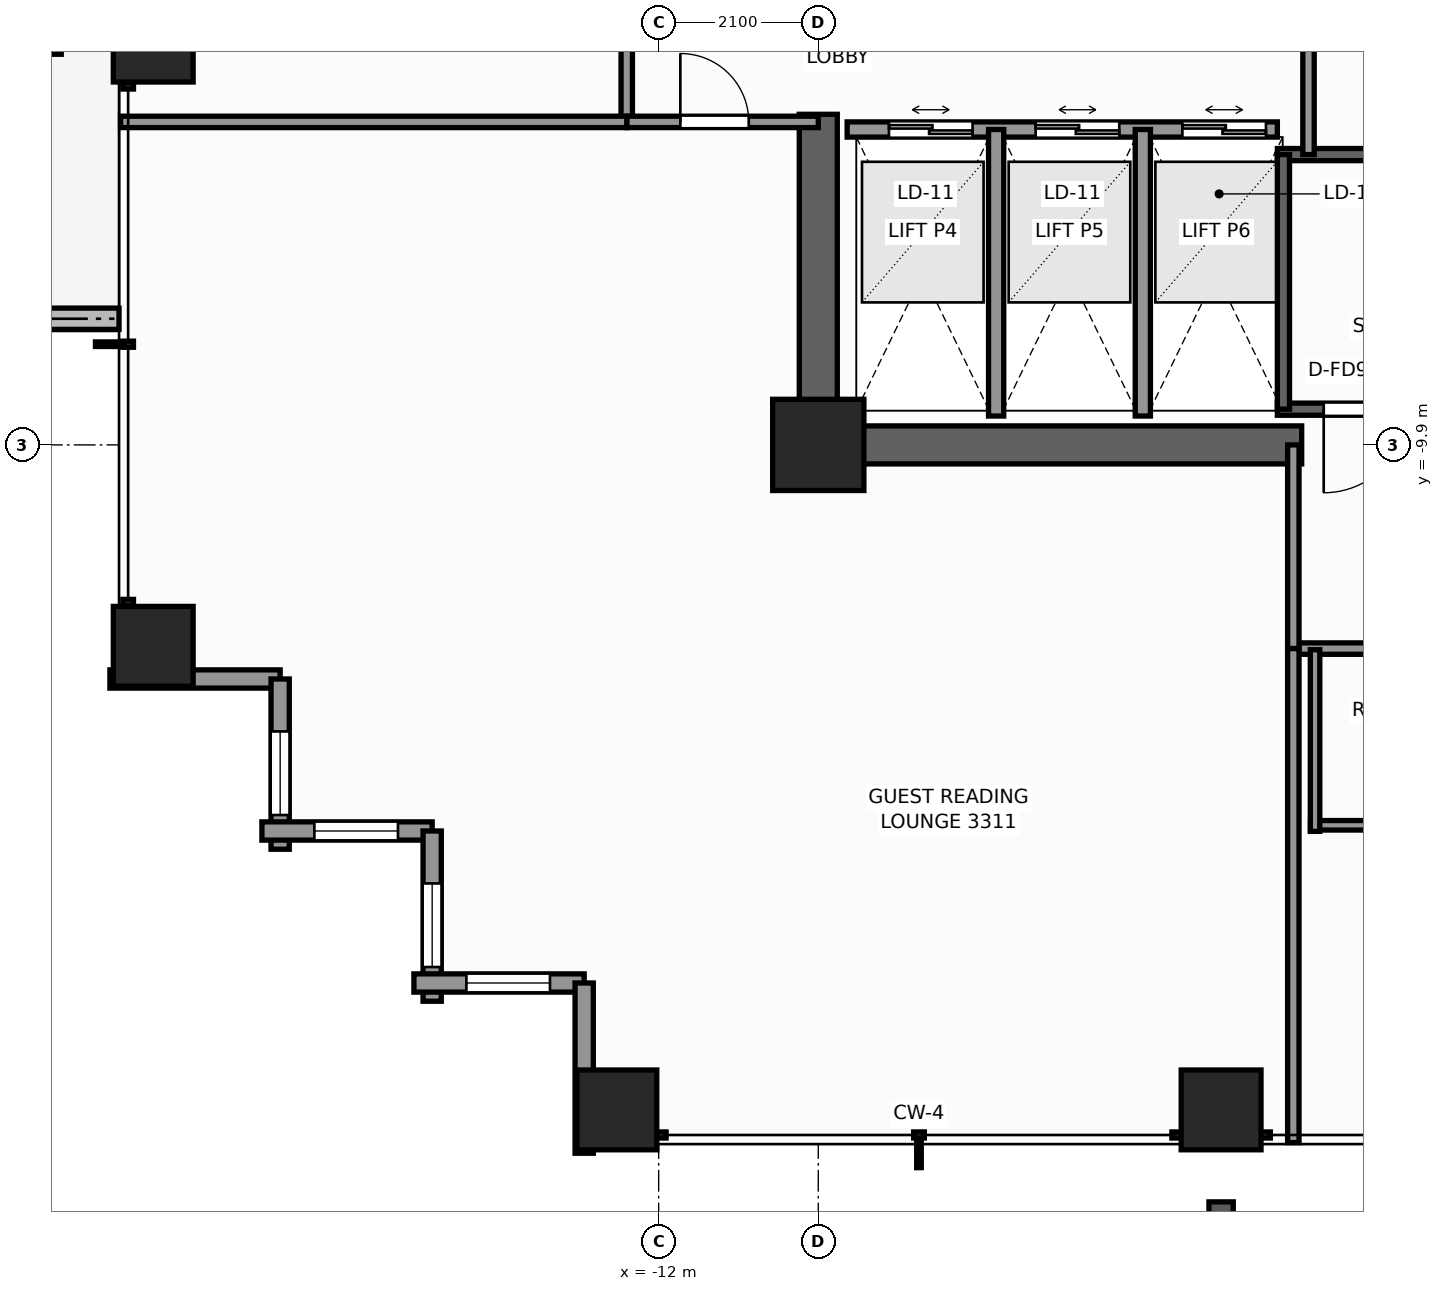
"""IFC4 building model, lengths in metres.
Left out: names, types, materials, properties, quantities, classifications, styles, units other than length and angle.
Written with IfcOpenShell. Run it as: python <this file> out.ifc"""

import sys

from ifc_helpers import new_model, si_unit, direction, frame, frame_2d, origin, origin_2d, place, context, subcontext, project, spatial, rectangle, extrude, element, fill, save


model = new_model("IFC4")
c1 = context("Model", 3, precision=1e-05, world=origin(), true_north=direction((0.0, 1.0)))
c2 = subcontext(c1, "Body", "Model", "MODEL_VIEW")
j1 = project(units=[si_unit("LENGTHUNIT", "METRE"), si_unit("PLANEANGLEUNIT", "RADIAN")], contexts=[c1])
p1 = place(None, origin())
s1 = spatial("IfcSite", under=j1, at=p1, CompositionType="ELEMENT")
p2 = place(p1, origin())
s2 = spatial("IfcBuilding", under=s1, at=p2, CompositionType="ELEMENT")
p3 = place(p2, frame((0.0, 0.0, 115.1)))
s3 = spatial("IfcBuildingStorey", under=s2, at=p3, CompositionType="ELEMENT", Elevation=115.1)
p4 = place(p3, frame((-3.54, -9.9, 0.0), z_axis=(0.0, 0.0, 1.0), x_axis=(-1.0, 0.0, 0.0)))
e1 = element("IfcWall", 1, at=p4, inside=s3, PredefinedType="SHEAR", context=c2, shape_type="SweptSolid", body=[
    extrude(rectangle(XDim=6.61, YDim=0.5, at=frame_2d((3.305, 0.0))), origin(), (0.0, 0.0, 1.0), 3.3),
])
p5 = place(p3, frame((-9.9, -9.65, 0.0), z_axis=(0.0, 0.0, 1.0), x_axis=(0.0, 1.0, 0.0)))
e2 = element("IfcWall", 2, at=p5, inside=s3, PredefinedType="SHEAR", context=c2, shape_type="SweptSolid", body=[
    extrude(rectangle(XDim=4.1, YDim=0.5, at=frame_2d((2.05, 0.0))), origin(), (0.0, 0.0, 1.0), 3.3),
])
p6 = place(p3, frame((-9.9, -9.9, 0.0), z_axis=(0.0, 0.0, 1.0), x_axis=(1.0, 0.0, 0.0)))
e3 = element("IfcColumn", 3, at=p6, inside=s3, PredefinedType="COLUMN", context=c2, shape_type="SweptSolid", body=[
    extrude(rectangle(XDim=1.2, YDim=1.2, at=origin_2d()), origin(), (0.0, 0.0, 1.0), 3.3),
])
for number, where, z_axis, x_axis in (
    (4, (-12.55, -18.65, 0.0), (0.0, 0.0, 1.0), (1.0, 0.0, 0.0)),
    (5, (-4.6, -18.65, 0.0), (0.0, 0.0, 1.0), (1.0, 0.0, 0.0)),
    (6, (-18.65, -12.55, 0.0), (0.0, 0.0, 1.0), (1.0, 0.0, 0.0)),
    (7, (-18.65, -4.6, 0.0), (0.0, 0.0, 1.0), (1.0, 0.0, 0.0)),
):
    element("IfcColumn", number, at=place(p3, frame(where, z_axis=z_axis, x_axis=x_axis)), inside=s3, PredefinedType="COLUMN", context=c2, shape_type="SweptSolid", body=[
        extrude(rectangle(XDim=1.05, YDim=1.05, at=origin_2d()), origin(), (0.0, 0.0, 1.0), 3.3),
    ])
p7 = place(p3, frame((-22.52, -8.24, -0.04), z_axis=(0.0, 0.0, 1.0), x_axis=(1.0, 0.0, 0.0)))
e8 = element("IfcWall", 8, at=p7, inside=s3, PredefinedType="PARAPET", context=c2, shape_type="SweptSolid", body=[
    extrude(rectangle(XDim=3.42, YDim=0.28, at=frame_2d((1.71, 0.0))), origin(), (0.0, 0.0, 1.0), 0.42),
])
p8 = place(p3, frame((-16.98, -12.98, 0.0), z_axis=(0.0, 0.0, 1.0), x_axis=(-1.0, 0.0, 0.0)))
e9 = element("IfcWall", 9, at=p8, inside=s3, PredefinedType="STANDARD", context=c2, shape_type="SweptSolid", body=[
    extrude(rectangle(XDim=2.24, YDim=0.24, at=frame_2d((1.12, 0.0))), origin(), (0.0, 0.0, 1.0), 2.459),
])
p9 = place(p3, frame((-16.98, -15.22, 0.0), z_axis=(0.0, 0.0, 1.0), x_axis=(0.0, 1.0, 0.0)))
e10 = element("IfcWall", 10, at=p9, inside=s3, PredefinedType="STANDARD", context=c2, shape_type="SweptSolid", body=[
    extrude(rectangle(XDim=2.24, YDim=0.24, at=frame_2d((1.12, 0.0))), origin(), (0.0, 0.0, 1.0), 2.459),
])
p10 = place(p9, frame((0.45, 0.0, 0.65)))
e11 = element("IfcOpeningElement", 11, at=p10, cuts=e10, PredefinedType="OPENING", context=c2, shape_type="SweptSolid", body=[
    extrude(rectangle(XDim=1.1, YDim=1.45, at=frame_2d((0.55, 0.725))), frame((0.0, 0.13, 0.0), z_axis=(0.0, -1.0, 0.0), x_axis=(1.0, 0.0, 0.0)), (0.0, 0.0, 1.0), 0.26),
])
p11 = place(p3, frame((-14.98, -14.98, 0.0), z_axis=(0.0, 0.0, 1.0), x_axis=(-1.0, 0.0, 0.0)))
e12 = element("IfcWall", 12, at=p11, inside=s3, PredefinedType="STANDARD", context=c2, shape_type="SweptSolid", body=[
    extrude(rectangle(XDim=2.24, YDim=0.24, at=frame_2d((1.12, 0.0))), origin(), (0.0, 0.0, 1.0), 2.459),
])
p12 = place(p11, frame((0.45, 0.0, 0.65)))
e13 = element("IfcOpeningElement", 13, at=p12, cuts=e12, PredefinedType="OPENING", context=c2, shape_type="SweptSolid", body=[
    extrude(rectangle(XDim=1.1, YDim=1.45, at=frame_2d((0.55, 0.725))), frame((0.0, 0.13, 0.0), z_axis=(0.0, -1.0, 0.0), x_axis=(1.0, 0.0, 0.0)), (0.0, 0.0, 1.0), 0.26),
])
p13 = place(p3, frame((-14.98, -17.22, 0.0), z_axis=(0.0, 0.0, 1.0), x_axis=(0.0, 1.0, 0.0)))
e14 = element("IfcWall", 14, at=p13, inside=s3, PredefinedType="STANDARD", context=c2, shape_type="SweptSolid", body=[
    extrude(rectangle(XDim=2.24, YDim=0.24, at=frame_2d((1.12, 0.0))), origin(), (0.0, 0.0, 1.0), 2.459),
])
p14 = place(p13, frame((0.45, 0.0, 0.65)))
e15 = element("IfcOpeningElement", 15, at=p14, cuts=e14, PredefinedType="OPENING", context=c2, shape_type="SweptSolid", body=[
    extrude(rectangle(XDim=1.1, YDim=1.45, at=frame_2d((0.55, 0.725))), frame((0.0, 0.13, 0.0), z_axis=(0.0, -1.0, 0.0), x_axis=(1.0, 0.0, 0.0)), (0.0, 0.0, 1.0), 0.26),
])
p15 = place(p3, frame((-12.98, -16.98, 0.0), z_axis=(0.0, 0.0, 1.0), x_axis=(-1.0, 0.0, 0.0)))
e16 = element("IfcWall", 16, at=p15, inside=s3, PredefinedType="STANDARD", context=c2, shape_type="SweptSolid", body=[
    extrude(rectangle(XDim=2.24, YDim=0.24, at=frame_2d((1.12, 0.0))), origin(), (0.0, 0.0, 1.0), 2.459),
])
p16 = place(p15, frame((0.45, 0.0, 0.65)))
e17 = element("IfcOpeningElement", 17, at=p16, cuts=e16, PredefinedType="OPENING", context=c2, shape_type="SweptSolid", body=[
    extrude(rectangle(XDim=1.1, YDim=1.45, at=frame_2d((0.55, 0.725))), frame((0.0, 0.13, 0.0), z_axis=(0.0, -1.0, 0.0), x_axis=(1.0, 0.0, 0.0)), (0.0, 0.0, 1.0), 0.26),
])
p17 = place(p3, frame((-12.98, -19.22, 0.0), z_axis=(0.0, 0.0, 1.0), x_axis=(0.0, 1.0, 0.0)))
e18 = element("IfcWall", 18, at=p17, inside=s3, PredefinedType="STANDARD", context=c2, shape_type="SweptSolid", body=[
    extrude(rectangle(XDim=2.24, YDim=0.24, at=frame_2d((1.12, 0.0))), origin(), (0.0, 0.0, 1.0), 2.459),
])
p18 = place(p3, frame((3.86, -9.43, 0.0), z_axis=(0.0, 0.0, 1.0), x_axis=(-1.0, 0.0, 0.0)))
e19 = element("IfcWall", 19, at=p18, inside=s3, PredefinedType="SHEAR", context=c2, shape_type="SweptSolid", body=[
    extrude(rectangle(XDim=7.72, YDim=0.16, at=frame_2d((3.86, 0.0))), origin(), (0.0, 0.0, 1.0), 3.3),
])
p19 = place(p18, frame((6.01, 0.0, 0.0)))
e20 = element("IfcOpeningElement", 20, at=p19, cuts=e19, PredefinedType="OPENING", context=c2, shape_type="SweptSolid", body=[
    extrude(rectangle(XDim=1.1, YDim=2.2, at=frame_2d((0.55, 1.1))), frame((0.0, 0.09, 0.0), z_axis=(0.0, -1.0, 0.0), x_axis=(1.0, 0.0, 0.0)), (0.0, 0.0, 1.0), 0.18),
])
p20 = place(p3, frame((-3.86, -6.08, 0.0), z_axis=(0.0, 0.0, 1.0), x_axis=(1.0, 0.0, 0.0)))
e21 = element("IfcWall", 21, at=p20, inside=s3, PredefinedType="SHEAR", context=c2, shape_type="SweptSolid", body=[
    extrude(rectangle(XDim=7.72, YDim=0.16, at=frame_2d((3.86, 0.0))), origin(), (0.0, 0.0, 1.0), 3.3),
])
p21 = place(p3, frame((-3.78, -9.43, 0.0), z_axis=(0.0, 0.0, 1.0), x_axis=(0.0, 1.0, 0.0)))
e22 = element("IfcWall", 22, at=p21, inside=s3, PredefinedType="SHEAR", context=c2, shape_type="SweptSolid", body=[
    extrude(rectangle(XDim=3.35, YDim=0.16, at=frame_2d((1.675, 0.0))), origin(), (0.0, 0.0, 1.0), 3.3),
])
p22 = place(p3, frame((-9.52, -5.75, 0.0), z_axis=(0.0, 0.0, 1.0), x_axis=(1.0, 0.0, 0.0)))
e23 = element("IfcWall", 23, at=p22, inside=s3, PredefinedType="SOLIDWALL", context=c2, shape_type="SweptSolid", body=[
    extrude(rectangle(XDim=5.66, YDim=0.2, at=frame_2d((2.83, 0.0))), origin(), (0.0, 0.0, 1.0), 3.08),
])
p23 = place(p22, frame((0.55, 0.0, 0.0)))
e24 = element("IfcOpeningElement", 24, at=p23, cuts=e23, PredefinedType="OPENING", context=c2, shape_type="SweptSolid", body=[
    extrude(rectangle(XDim=1.1, YDim=2.2, at=frame_2d((0.55, 1.1))), frame((0.0, 0.11, 0.0), z_axis=(0.0, -1.0, 0.0), x_axis=(1.0, 0.0, 0.0)), (0.0, 0.0, 1.0), 0.22),
])
p24 = place(p22, frame((2.48, 0.0, 0.0)))
e25 = element("IfcOpeningElement", 25, at=p24, cuts=e23, PredefinedType="OPENING", context=c2, shape_type="SweptSolid", body=[
    extrude(rectangle(XDim=1.1, YDim=2.2, at=frame_2d((0.55, 1.1))), frame((0.0, 0.11, 0.0), z_axis=(0.0, -1.0, 0.0), x_axis=(1.0, 0.0, 0.0)), (0.0, 0.0, 1.0), 0.22),
])
p25 = place(p22, frame((4.41, 0.0, 0.0)))
e26 = element("IfcOpeningElement", 26, at=p25, cuts=e23, PredefinedType="OPENING", context=c2, shape_type="SweptSolid", body=[
    extrude(rectangle(XDim=1.1, YDim=2.2, at=frame_2d((0.55, 1.1))), frame((0.0, 0.11, 0.0), z_axis=(0.0, -1.0, 0.0), x_axis=(1.0, 0.0, 0.0)), (0.0, 0.0, 1.0), 0.22),
])
for number, where, z_axis, x_axis in (
    (27, (-7.56, -9.52, 0.0), (0.0, 0.0, 1.0), (0.0, 1.0, 0.0)),
    (28, (-5.63, -9.52, 0.0), (0.0, 0.0, 1.0), (0.0, 1.0, 0.0)),
):
    element("IfcWall", number, at=place(p3, frame(where, z_axis=z_axis, x_axis=x_axis)), inside=s3, PredefinedType="SOLIDWALL", context=c2, shape_type="SweptSolid", body=[
        extrude(rectangle(XDim=3.77, YDim=0.2, at=frame_2d((1.885, 0.0))), origin(), (0.0, 0.0, 1.0), 3.08),
    ])
p26 = place(p3, frame((-3.45, -6.08, 0.0), z_axis=(0.0, 0.0, 1.0), x_axis=(0.0, 1.0, 0.0)))
e29 = element("IfcWall", 29, at=p26, inside=s3, PredefinedType="PARTITIONING", context=c2, shape_type="SweptSolid", body=[
    extrude(rectangle(XDim=2.36, YDim=0.15, at=frame_2d((1.18, 0.0))), origin(), (0.0, 0.0, 1.0), 3.08),
])
p27 = place(p3, frame((-3.65, -12.58, 0.0), z_axis=(0.0, 0.0, 1.0), x_axis=(1.0, 0.0, 0.0)))
e30 = element("IfcWall", 30, at=p27, inside=s3, PredefinedType="PARTITIONING", context=c2, shape_type="SweptSolid", body=[
    extrude(rectangle(XDim=15.91, YDim=0.15, at=frame_2d((7.955, 0.0))), origin(), (0.0, 0.0, 1.0), 2.292),
])
p28 = place(p27, frame((5.109, 0.0, 0.0)))
e31 = element("IfcOpeningElement", 31, at=p28, cuts=e30, PredefinedType="OPENING", context=c2, shape_type="SweptSolid", body=[
    extrude(rectangle(XDim=0.95, YDim=2.06, at=frame_2d((0.475, 1.03))), frame((0.0, 0.085, 0.0), z_axis=(0.0, -1.0, 0.0), x_axis=(1.0, 0.0, 0.0)), (0.0, 0.0, 1.0), 0.17),
])
p29 = place(p27, frame((9.858, 0.0, 0.0)))
e32 = element("IfcOpeningElement", 32, at=p29, cuts=e30, PredefinedType="OPENING", context=c2, shape_type="SweptSolid", body=[
    extrude(rectangle(XDim=0.9, YDim=2.06, at=frame_2d((0.45, 1.03))), frame((0.0, 0.085, 0.0), z_axis=(0.0, -1.0, 0.0), x_axis=(1.0, 0.0, 0.0)), (0.0, 0.0, 1.0), 0.17),
])
p30 = place(p27, frame((12.028, 0.0, 0.0)))
e33 = element("IfcOpeningElement", 33, at=p30, cuts=e30, PredefinedType="OPENING", context=c2, shape_type="SweptSolid", body=[
    extrude(rectangle(XDim=0.9, YDim=2.06, at=frame_2d((0.45, 1.03))), frame((0.0, 0.085, 0.0), z_axis=(0.0, -1.0, 0.0), x_axis=(1.0, 0.0, 0.0)), (0.0, 0.0, 1.0), 0.17),
])
p31 = place(p3, frame((-3.65, -12.58, 0.0), z_axis=(0.0, 0.0, 1.0), x_axis=(0.0, 1.0, 0.0)))
e34 = element("IfcWall", 34, at=p31, inside=s3, PredefinedType="PARTITIONING", context=c2, shape_type="SweptSolid", body=[
    extrude(rectangle(XDim=2.68, YDim=0.15, at=frame_2d((1.34, 0.0))), origin(), (0.0, 0.0, 1.0), 3.08),
])
p32 = place(p3, frame((-12.42, -5.65, 0.0), z_axis=(0.0, 0.0, 1.0), x_axis=(0.0, 1.0, 0.0)))
e35 = element("IfcWall", 35, at=p32, inside=s3, PredefinedType="PARTITIONING", context=c2, shape_type="SweptSolid", body=[
    extrude(rectangle(XDim=3.6, YDim=0.15, at=frame_2d((1.8, 0.0))), origin(), (0.0, 0.0, 1.0), 2.292),
])
p33 = place(p32, frame((2.156, 0.0, 0.0)))
e36 = element("IfcOpeningElement", 36, at=p33, cuts=e35, PredefinedType="OPENING", context=c2, shape_type="SweptSolid", body=[
    extrude(rectangle(XDim=0.9, YDim=2.06, at=frame_2d((0.45, 1.03))), frame((0.0, 0.085, 0.0), z_axis=(0.0, -1.0, 0.0), x_axis=(1.0, 0.0, 0.0)), (0.0, 0.0, 1.0), 0.17),
])
p34 = place(p3, frame((-12.42, -5.65, 0.0), z_axis=(0.0, 0.0, 1.0), x_axis=(1.0, 0.0, 0.0)))
e37 = element("IfcWall", 37, at=p34, inside=s3, PredefinedType="PARTITIONING", context=c2, shape_type="SweptSolid", body=[
    extrude(rectangle(XDim=2.52, YDim=0.15, at=frame_2d((1.26, 0.0))), origin(), (0.0, 0.0, 1.0), 3.08),
])
p35 = place(p34, frame((0.705, 0.0, 0.0)))
e38 = element("IfcOpeningElement", 38, at=p35, cuts=e37, PredefinedType="OPENING", context=c2, shape_type="SweptSolid", body=[
    extrude(rectangle(XDim=0.9, YDim=2.06, at=frame_2d((0.45, 1.03))), frame((0.0, 0.085, 0.0), z_axis=(0.0, -1.0, 0.0), x_axis=(1.0, 0.0, 0.0)), (0.0, 0.0, 1.0), 0.17),
])
p36 = place(p3, frame((-19.08, -5.65, 0.0), z_axis=(0.0, 0.0, 1.0), x_axis=(1.0, 0.0, 0.0)))
e39 = element("IfcWall", 39, at=p36, inside=s3, PredefinedType="PARTITIONING", context=c2, shape_type="SweptSolid", body=[
    extrude(rectangle(XDim=6.66, YDim=0.15, at=frame_2d((3.33, 0.0))), origin(), (0.0, 0.0, 1.0), 2.449),
])
p37 = place(p3, frame((-3.65, -19.08, 0.0), z_axis=(0.0, 0.0, 1.0), x_axis=(0.0, 1.0, 0.0)))
e40 = element("IfcWall", 40, at=p37, inside=s3, PredefinedType="PARTITIONING", context=c2, shape_type="SweptSolid", body=[
    extrude(rectangle(XDim=6.5, YDim=0.15, at=frame_2d((3.25, 0.0))), origin(), (0.0, 0.0, 1.0), 2.449),
])
p38 = place(p3, frame((-3.424, -14.905, 0.0), z_axis=(0.0, 0.0, 1.0), x_axis=(1.0, 0.0, 0.0)))
e41 = element("IfcWall", 41, at=p38, inside=s3, PredefinedType="PARTITIONING", context=c2, shape_type="SweptSolid", body=[
    extrude(rectangle(XDim=2.77, YDim=0.125, at=frame_2d((1.385, 0.0))), origin(), (0.0, 0.0, 1.0), 2.369),
])
p39 = place(p3, frame((-3.364, -14.985, 0.0), z_axis=(0.0, 0.0, 1.0), x_axis=(0.0, 1.0, 0.0)))
e42 = element("IfcWall", 42, at=p39, inside=s3, PredefinedType="PARTITIONING", context=c2, shape_type="SweptSolid", body=[
    extrude(rectangle(XDim=2.39, YDim=0.125, at=frame_2d((1.195, 0.0))), origin(), (0.0, 0.0, 1.0), 3.08),
])
p40 = place(p10, origin())
e43 = element("IfcWindow", 43, at=p40, inside=s3, PartitioningType="SINGLE_PANEL", PredefinedType="WINDOW", context=c2, shape_type="SweptSolid", body=[
    extrude(rectangle(XDim=1.1, YDim=1.45, at=frame_2d((0.55, 0.725))), frame((0.0, 0.03, 0.0), z_axis=(0.0, -1.0, 0.0), x_axis=(1.0, 0.0, 0.0)), (0.0, 0.0, 1.0), 0.06),
])
fill(e11, e43)
p41 = place(p12, origin())
e44 = element("IfcWindow", 44, at=p41, inside=s3, PartitioningType="SINGLE_PANEL", PredefinedType="WINDOW", context=c2, shape_type="SweptSolid", body=[
    extrude(rectangle(XDim=1.1, YDim=1.45, at=frame_2d((0.55, 0.725))), frame((0.0, 0.03, 0.0), z_axis=(0.0, -1.0, 0.0), x_axis=(1.0, 0.0, 0.0)), (0.0, 0.0, 1.0), 0.06),
])
fill(e13, e44)
p42 = place(p14, origin())
e45 = element("IfcWindow", 45, at=p42, inside=s3, PartitioningType="SINGLE_PANEL", PredefinedType="WINDOW", context=c2, shape_type="SweptSolid", body=[
    extrude(rectangle(XDim=1.1, YDim=1.45, at=frame_2d((0.55, 0.725))), frame((0.0, 0.03, 0.0), z_axis=(0.0, -1.0, 0.0), x_axis=(1.0, 0.0, 0.0)), (0.0, 0.0, 1.0), 0.06),
])
fill(e15, e45)
p43 = place(p16, origin())
e46 = element("IfcWindow", 46, at=p43, inside=s3, PartitioningType="SINGLE_PANEL", PredefinedType="WINDOW", context=c2, shape_type="SweptSolid", body=[
    extrude(rectangle(XDim=1.1, YDim=1.45, at=frame_2d((0.55, 0.725))), frame((0.0, 0.03, 0.0), z_axis=(0.0, -1.0, 0.0), x_axis=(1.0, 0.0, 0.0)), (0.0, 0.0, 1.0), 0.06),
])
fill(e17, e46)
p44 = place(p19, origin())
e47 = element("IfcDoor", 47, at=p44, inside=s3, OperationType="SINGLE_SWING_RIGHT", PredefinedType="DOOR", context=c2, shape_type="SweptSolid", body=[
    extrude(rectangle(XDim=1.1, YDim=2.2, at=frame_2d((0.55, 1.1))), frame((0.0, 0.025, 0.0), z_axis=(0.0, -1.0, 0.0), x_axis=(1.0, 0.0, 0.0)), (0.0, 0.0, 1.0), 0.05),
])
fill(e20, e47)
p45 = place(p23, origin())
e48 = element("IfcDoor", 48, at=p45, inside=s3, OperationType="DOUBLE_DOOR_SLIDING", PredefinedType="DOOR", context=c2, shape_type="SweptSolid", body=[
    extrude(rectangle(XDim=1.1, YDim=2.2, at=frame_2d((0.55, 1.1))), frame((0.0, 0.025, 0.0), z_axis=(0.0, -1.0, 0.0), x_axis=(1.0, 0.0, 0.0)), (0.0, 0.0, 1.0), 0.05),
])
fill(e24, e48)
p46 = place(p24, origin())
e49 = element("IfcDoor", 49, at=p46, inside=s3, OperationType="DOUBLE_DOOR_SLIDING", PredefinedType="DOOR", context=c2, shape_type="SweptSolid", body=[
    extrude(rectangle(XDim=1.1, YDim=2.2, at=frame_2d((0.55, 1.1))), frame((0.0, 0.025, 0.0), z_axis=(0.0, -1.0, 0.0), x_axis=(1.0, 0.0, 0.0)), (0.0, 0.0, 1.0), 0.05),
])
fill(e25, e49)
p47 = place(p25, origin())
e50 = element("IfcDoor", 50, at=p47, inside=s3, OperationType="DOUBLE_DOOR_SLIDING", PredefinedType="DOOR", context=c2, shape_type="SweptSolid", body=[
    extrude(rectangle(XDim=1.1, YDim=2.2, at=frame_2d((0.55, 1.1))), frame((0.0, 0.025, 0.0), z_axis=(0.0, -1.0, 0.0), x_axis=(1.0, 0.0, 0.0)), (0.0, 0.0, 1.0), 0.05),
])
fill(e26, e50)
p48 = place(p35, origin())
e51 = element("IfcDoor", 51, at=p48, inside=s3, OperationType="SINGLE_SWING_LEFT", PredefinedType="DOOR", context=c2, shape_type="SweptSolid", body=[
    extrude(rectangle(XDim=0.9, YDim=2.06, at=frame_2d((0.45, 1.03))), frame((0.0, 0.025, 0.0), z_axis=(0.0, -1.0, 0.0), x_axis=(1.0, 0.0, 0.0)), (0.0, 0.0, 1.0), 0.05),
])
fill(e38, e51)
save(model, sys.argv[1])
